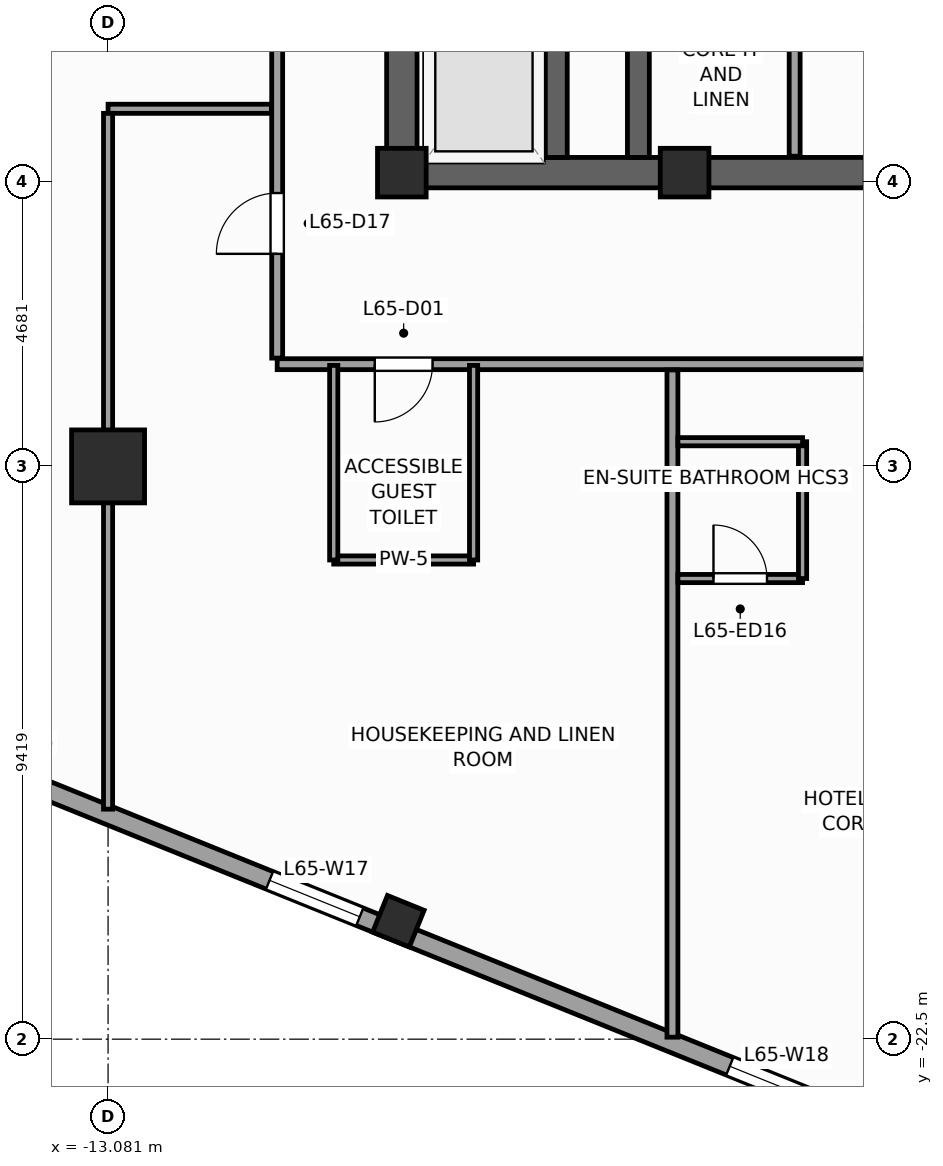
"""IFC4 building model, lengths in metres.
Left out: names, types, materials, properties, quantities, classifications, styles, units other than length and angle.
Written with IfcOpenShell. Run it as: python <this file> out.ifc"""

import sys

from ifc_helpers import new_model, si_unit, direction, frame, frame_2d, origin, origin_2d, place, context, subcontext, project, spatial, rectangle, extrude, source, transform, mapped, element, fill, save


model = new_model("IFC4")
c1 = context("Model", 3, precision=1e-05, world=origin(), true_north=direction((0.0, 1.0)))
c2 = subcontext(c1, "Body", "Model", "MODEL_VIEW")
j1 = project(units=[si_unit("LENGTHUNIT", "METRE"), si_unit("PLANEANGLEUNIT", "RADIAN")], contexts=[c1])
p1 = place(None, origin())
s1 = spatial("IfcSite", under=j1, at=p1, CompositionType="ELEMENT")
p2 = place(p1, origin())
s2 = spatial("IfcBuilding", under=s1, at=p2, CompositionType="ELEMENT")
p3 = place(p2, frame((0.0, 0.0, 268.8)))
s3 = spatial("IfcBuildingStorey", under=s2, at=p3, CompositionType="ELEMENT", Elevation=268.8)
p4 = place(p3, frame((-8.5, -8.25, 0.0), z_axis=(0.0, 0.0, 1.0), x_axis=(1.0, 0.0, 0.0)))
e1 = element("IfcWall", 1, at=p4, inside=s3, PredefinedType="SHEAR", context=c2, shape_type="SweptSolid", body=[
    extrude(rectangle(XDim=17.0, YDim=0.5, at=frame_2d((8.5, 0.0))), origin(), (0.0, 0.0, 1.0), 3.6),
])
p5 = place(p4, frame((7.85, 0.0, 0.0)))
e2 = element("IfcOpeningElement", 2, at=p5, cuts=e1, PredefinedType="OPENING", context=c2, shape_type="SweptSolid", body=[
    extrude(rectangle(XDim=1.3, YDim=2.2, at=frame_2d((0.65, 1.1))), frame((0.0, 0.26, 0.0), z_axis=(0.0, -1.0, 0.0), x_axis=(1.0, 0.0, 0.0)), (0.0, 0.0, 1.0), 0.52),
])
p6 = place(p3, frame((-8.25, -8.0, 0.0), z_axis=(0.0, 0.0, 1.0), x_axis=(0.0, 1.0, 0.0)))
e3 = element("IfcWall", 3, at=p6, inside=s3, PredefinedType="SHEAR", context=c2, shape_type="SweptSolid", body=[
    extrude(rectangle(XDim=16.0, YDim=0.5, at=frame_2d((8.0, 0.0))), origin(), (0.0, 0.0, 1.0), 3.6),
])
p7 = place(p6, frame((4.69, 0.0, 0.0)))
e4 = element("IfcOpeningElement", 4, at=p7, cuts=e3, PredefinedType="OPENING", context=c2, shape_type="SweptSolid", body=[
    extrude(rectangle(XDim=1.3, YDim=2.2, at=frame_2d((0.65, 1.1))), frame((0.0, 0.26, 0.0), z_axis=(0.0, -1.0, 0.0), x_axis=(1.0, 0.0, 0.0)), (0.0, 0.0, 1.0), 0.52),
])
p8 = place(p3, frame((-4.36, -8.0, 0.0), z_axis=(0.0, 0.0, 1.0), x_axis=(0.0, 1.0, 0.0)))
e5 = element("IfcWall", 5, at=p8, inside=s3, PredefinedType="SHEAR", context=c2, shape_type="SweptSolid", body=[
    extrude(rectangle(XDim=16.0, YDim=0.36, at=frame_2d((8.0, 0.0))), origin(), (0.0, 0.0, 1.0), 3.6),
])
p9 = place(p3, frame((-5.71, -8.0, 0.0), z_axis=(0.0, 0.0, 1.0), x_axis=(0.0, 1.0, 0.0)))
e6 = element("IfcWall", 6, at=p9, inside=s3, PredefinedType="SHEAR", context=c2, shape_type="SweptSolid", body=[
    extrude(rectangle(XDim=2.54, YDim=0.36, at=frame_2d((1.27, 0.0))), origin(), (0.0, 0.0, 1.0), 3.6),
])
m1 = source(origin(), c2, "Body", "SweptSolid", [
    extrude(rectangle(XDim=0.8, YDim=0.8, at=origin_2d()), origin(), (0.0, 0.0, 1.0), 3.6),
])
for number, where, z_axis, x_axis in (
    (7, (-8.25, -8.25, 0.0), (0.0, 0.0, 1.0), (1.0, 0.0, 0.0)),
    (8, (-3.6, -8.25, 0.0), (0.0, 0.0, 1.0), (1.0, 0.0, 0.0)),
):
    element("IfcColumn", number, at=place(p3, frame(where, z_axis=z_axis, x_axis=x_axis)), inside=s3, PredefinedType="PILASTER", context=c2, shape_type="MappedRepresentation", body=[
        mapped(m1, transform((0.0, 0.0, 0.0), scale=1.0)),
    ])
m2 = source(origin(), c2, "Body", "SweptSolid", [
    extrude(rectangle(XDim=1.2, YDim=1.2, at=origin_2d()), origin(), (0.0, 0.0, 1.0), 3.6),
])
p10 = place(p3, frame((-13.081, -13.081, 0.0), z_axis=(0.0, 0.0, 1.0), x_axis=(1.0, 0.0, 0.0)))
e9 = element("IfcColumn", 9, at=p10, inside=s3, PredefinedType="COLUMN", context=c2, shape_type="MappedRepresentation", body=[
    mapped(m2, transform((0.0, 0.0, 0.0), scale=1.0)),
])
m3 = source(origin(), c2, "Body", "SweptSolid", [
    extrude(rectangle(XDim=0.65, YDim=0.65, at=origin_2d()), origin(), (0.0, 0.0, 1.0), 3.6),
])
p11 = place(p3, frame((-8.307, -20.56, 0.0), z_axis=(0.0, 0.0, 1.0), x_axis=(0.374606593416, 0.927183854567, 0.0)))
e10 = element("IfcColumn", 10, at=p11, inside=s3, PredefinedType="COLUMN", context=c2, shape_type="MappedRepresentation", body=[
    mapped(m3, transform((0.0, 0.0, 0.0), scale=1.0)),
])
p12 = place(p3, frame((-23.813, -14.479, 0.0), z_axis=(0.0, 0.0, 1.0), x_axis=(0.927182657188, -0.374609557019, 0.0)))
e11 = element("IfcWall", 11, at=p12, inside=s3, PredefinedType="STANDARD", context=c2, shape_type="SweptSolid", body=[
    extrude(rectangle(XDim=33.31, YDim=0.31, at=frame_2d((16.655, 0.0))), origin(), (0.0, 0.0, 1.0), 2.75),
])
p13 = place(p12, frame((3.197, 0.0, 0.47)))
e12 = element("IfcOpeningElement", 12, at=p13, cuts=e11, PredefinedType="OPENING", context=c2, shape_type="SweptSolid", body=[
    extrude(rectangle(XDim=1.6, YDim=2.1, at=frame_2d((0.8, 1.05))), frame((0.0, 0.165, 0.0), z_axis=(0.0, -1.0, 0.0), x_axis=(1.0, 0.0, 0.0)), (0.0, 0.0, 1.0), 0.33),
])
p14 = place(p12, frame((8.86, 0.0, 0.47)))
e13 = element("IfcOpeningElement", 13, at=p14, cuts=e11, PredefinedType="OPENING", context=c2, shape_type="SweptSolid", body=[
    extrude(rectangle(XDim=1.6, YDim=2.1, at=frame_2d((0.8, 1.05))), frame((0.0, 0.165, 0.0), z_axis=(0.0, -1.0, 0.0), x_axis=(1.0, 0.0, 0.0)), (0.0, 0.0, 1.0), 0.33),
])
p15 = place(p12, frame((14.439, 0.0, 0.47)))
e14 = element("IfcOpeningElement", 14, at=p15, cuts=e11, PredefinedType="OPENING", context=c2, shape_type="SweptSolid", body=[
    extrude(rectangle(XDim=1.6, YDim=2.1, at=frame_2d((0.8, 1.05))), frame((0.0, 0.165, 0.0), z_axis=(0.0, -1.0, 0.0), x_axis=(1.0, 0.0, 0.0)), (0.0, 0.0, 1.0), 0.33),
])
p16 = place(p12, frame((22.601, 0.0, 0.47)))
e15 = element("IfcOpeningElement", 15, at=p16, cuts=e11, PredefinedType="OPENING", context=c2, shape_type="SweptSolid", body=[
    extrude(rectangle(XDim=1.6, YDim=2.1, at=frame_2d((0.8, 1.05))), frame((0.0, 0.165, 0.0), z_axis=(0.0, -1.0, 0.0), x_axis=(1.0, 0.0, 0.0)), (0.0, 0.0, 1.0), 0.33),
])
p17 = place(p12, frame((27.097, 0.0, 0.47)))
e16 = element("IfcOpeningElement", 16, at=p17, cuts=e11, PredefinedType="OPENING", context=c2, shape_type="SweptSolid", body=[
    extrude(rectangle(XDim=1.6, YDim=2.1, at=frame_2d((0.8, 1.05))), frame((0.0, 0.165, 0.0), z_axis=(0.0, -1.0, 0.0), x_axis=(1.0, 0.0, 0.0)), (0.0, 0.0, 1.0), 0.33),
])
p18 = place(p3, frame((-1.79, -7.98, 0.0), z_axis=(0.0, 0.0, 1.0), x_axis=(0.0, 1.0, 0.0)))
e17 = element("IfcWall", 17, at=p18, inside=s3, PredefinedType="PARTITIONING", context=c2, shape_type="SweptSolid", body=[
    extrude(rectangle(XDim=12.38, YDim=0.18, at=frame_2d((6.19, 0.0))), origin(), (0.0, 0.0, 1.0), 3.35),
])
p19 = place(p18, frame((8.8, 0.0, 0.0)))
e18 = element("IfcOpeningElement", 18, at=p19, cuts=e17, PredefinedType="OPENING", context=c2, shape_type="SweptSolid", body=[
    extrude(rectangle(XDim=1.1, YDim=2.2, at=frame_2d((0.55, 1.1))), frame((0.0, 0.1, 0.0), z_axis=(0.0, -1.0, 0.0), x_axis=(1.0, 0.0, 0.0)), (0.0, 0.0, 1.0), 0.2),
])
p20 = place(p18, frame((10.86, 0.0, 0.0)))
e19 = element("IfcOpeningElement", 19, at=p20, cuts=e17, PredefinedType="OPENING", context=c2, shape_type="SweptSolid", body=[
    extrude(rectangle(XDim=1.1, YDim=2.2, at=frame_2d((0.55, 1.1))), frame((0.0, 0.1, 0.0), z_axis=(0.0, -1.0, 0.0), x_axis=(1.0, 0.0, 0.0)), (0.0, 0.0, 1.0), 0.2),
])
p21 = place(p18, frame((3.5, 0.0, 0.0)))
e20 = element("IfcOpeningElement", 20, at=p21, cuts=e17, PredefinedType="OPENING", context=c2, shape_type="SweptSolid", body=[
    extrude(rectangle(XDim=1.15, YDim=2.25, at=frame_2d((0.575, 1.125))), frame((0.0, 0.1, 0.0), z_axis=(0.0, -1.0, 0.0), x_axis=(1.0, 0.0, 0.0)), (0.0, 0.0, 1.0), 0.2),
])
p22 = place(p3, frame((-10.3, -11.4, 0.0), z_axis=(0.0, 0.0, 1.0), x_axis=(1.0, 0.0, 0.0)))
e21 = element("IfcWall", 21, at=p22, inside=s3, PredefinedType="PARTITIONING", context=c2, shape_type="SweptSolid", body=[
    extrude(rectangle(XDim=21.7, YDim=0.18, at=frame_2d((10.85, 0.0))), origin(), (0.0, 0.0, 1.0), 3.35),
])
p23 = place(p22, frame((1.605, 0.0, 0.0)))
e22 = element("IfcOpeningElement", 22, at=p23, cuts=e21, PredefinedType="OPENING", context=c2, shape_type="SweptSolid", body=[
    extrude(rectangle(XDim=0.95, YDim=2.1, at=frame_2d((0.475, 1.05))), frame((0.0, 0.1, 0.0), z_axis=(0.0, -1.0, 0.0), x_axis=(1.0, 0.0, 0.0)), (0.0, 0.0, 1.0), 0.2),
])
p24 = place(p22, frame((17.236, 0.0, 0.0)))
e23 = element("IfcOpeningElement", 23, at=p24, cuts=e21, PredefinedType="OPENING", context=c2, shape_type="SweptSolid", body=[
    extrude(rectangle(XDim=1.0, YDim=2.15, at=frame_2d((0.5, 1.075))), frame((0.0, 0.1, 0.0), z_axis=(0.0, -1.0, 0.0), x_axis=(1.0, 0.0, 0.0)), (0.0, 0.0, 1.0), 0.2),
])
p25 = place(p22, frame((9.8, 0.0, 0.0)))
e24 = element("IfcOpeningElement", 24, at=p25, cuts=e21, PredefinedType="OPENING", context=c2, shape_type="SweptSolid", body=[
    extrude(rectangle(XDim=1.0, YDim=2.15, at=frame_2d((0.5, 1.075))), frame((0.0, 0.1, 0.0), z_axis=(0.0, -1.0, 0.0), x_axis=(1.0, 0.0, 0.0)), (0.0, 0.0, 1.0), 0.2),
])
p26 = place(p3, frame((-10.3, -11.3, 0.0), z_axis=(0.0, 0.0, 1.0), x_axis=(0.0, 1.0, 0.0)))
e25 = element("IfcWall", 25, at=p26, inside=s3, PredefinedType="PARTITIONING", context=c2, shape_type="SweptSolid", body=[
    extrude(rectangle(XDim=21.5, YDim=0.18, at=frame_2d((10.75, 0.0))), origin(), (0.0, 0.0, 1.0), 3.35),
])
p27 = place(p26, frame((12.9, 0.0, 0.0)))
e26 = element("IfcOpeningElement", 26, at=p27, cuts=e25, PredefinedType="OPENING", context=c2, shape_type="SweptSolid", body=[
    extrude(rectangle(XDim=1.0, YDim=2.15, at=frame_2d((0.5, 1.075))), frame((0.0, 0.1, 0.0), z_axis=(0.0, -1.0, 0.0), x_axis=(1.0, 0.0, 0.0)), (0.0, 0.0, 1.0), 0.2),
])
p28 = place(p26, frame((17.736, 0.0, 0.0)))
e27 = element("IfcOpeningElement", 27, at=p28, cuts=e25, PredefinedType="OPENING", context=c2, shape_type="SweptSolid", body=[
    extrude(rectangle(XDim=1.0, YDim=2.15, at=frame_2d((0.5, 1.075))), frame((0.0, 0.1, 0.0), z_axis=(0.0, -1.0, 0.0), x_axis=(1.0, 0.0, 0.0)), (0.0, 0.0, 1.0), 0.2),
])
p29 = place(p26, frame((1.714, 0.0, 0.0)))
e28 = element("IfcOpeningElement", 28, at=p29, cuts=e25, PredefinedType="OPENING", context=c2, shape_type="SweptSolid", body=[
    extrude(rectangle(XDim=1.0, YDim=2.15, at=frame_2d((0.5, 1.075))), frame((0.0, 0.1, 0.0), z_axis=(0.0, -1.0, 0.0), x_axis=(1.0, 0.0, 0.0)), (0.0, 0.0, 1.0), 0.2),
])
p30 = place(p26, frame((5.4, 0.0, 0.0)))
e29 = element("IfcOpeningElement", 29, at=p30, cuts=e25, PredefinedType="OPENING", context=c2, shape_type="SweptSolid", body=[
    extrude(rectangle(XDim=1.0, YDim=2.15, at=frame_2d((0.5, 1.075))), frame((0.0, 0.1, 0.0), z_axis=(0.0, -1.0, 0.0), x_axis=(1.0, 0.0, 0.0)), (0.0, 0.0, 1.0), 0.2),
])
p31 = place(p26, frame((9.1, 0.0, 0.0)))
e30 = element("IfcOpeningElement", 30, at=p31, cuts=e25, PredefinedType="OPENING", context=c2, shape_type="SweptSolid", body=[
    extrude(rectangle(XDim=1.0, YDim=2.15, at=frame_2d((0.5, 1.075))), frame((0.0, 0.1, 0.0), z_axis=(0.0, -1.0, 0.0), x_axis=(1.0, 0.0, 0.0)), (0.0, 0.0, 1.0), 0.2),
])
p32 = place(p3, frame((-3.8, -11.495, 0.0), z_axis=(0.0, 0.0, 1.0), x_axis=(0.0, -1.0, 0.0)))
e31 = element("IfcWall", 31, at=p32, inside=s3, PredefinedType="PARTITIONING", context=c2, shape_type="SweptSolid", body=[
    extrude(rectangle(XDim=10.972, YDim=0.18, at=frame_2d((5.486, 0.0))), origin(), (0.0, 0.0, 1.0), 3.35),
])
p33 = place(p3, frame((-10.395, -7.2, 0.0), z_axis=(0.0, 0.0, 1.0), x_axis=(-1.0, 0.0, 0.0)))
e32 = element("IfcWall", 32, at=p33, inside=s3, PredefinedType="PARTITIONING", context=c2, shape_type="SweptSolid", body=[
    extrude(rectangle(XDim=2.686, YDim=0.15, at=frame_2d((1.343, 0.0))), origin(), (0.0, 0.0, 1.0), 3.35),
])
p34 = place(p3, frame((-13.081, -7.275, 0.0), z_axis=(0.0, 0.0, 1.0), x_axis=(0.0, -1.0, 0.0)))
e33 = element("IfcWall", 33, at=p34, inside=s3, PredefinedType="PARTITIONING", context=c2, shape_type="SweptSolid", body=[
    extrude(rectangle(XDim=11.443, YDim=0.15, at=frame_2d((5.721, 0.0))), origin(), (0.0, 0.0, 1.0), 2.45),
])
p35 = place(p3, frame((-9.37, -14.62, 0.0), z_axis=(0.0, 0.0, 1.0), x_axis=(1.0, 0.0, 0.0)))
e34 = element("IfcWall", 34, at=p35, inside=s3, PredefinedType="PARTITIONING", context=c2, shape_type="SweptSolid", body=[
    extrude(rectangle(XDim=2.3, YDim=0.135, at=frame_2d((1.15, 0.0))), origin(), (0.0, 0.0, 1.0), 2.95),
])
for number, where, z_axis, x_axis in (
    (35, (-7.07, -14.62, 0.0), (0.0, 0.0, 1.0), (0.0, 1.0, 0.0)),
    (36, (-9.37, -14.62, 0.0), (0.0, 0.0, 1.0), (0.0, 1.0, 0.0)),
):
    element("IfcWall", number, at=place(p3, frame(where, z_axis=z_axis, x_axis=x_axis)), inside=s3, PredefinedType="PARTITIONING", context=c2, shape_type="SweptSolid", body=[
        extrude(rectangle(XDim=3.2, YDim=0.135, at=frame_2d((1.6, 0.0))), origin(), (0.0, 0.0, 1.0), 3.35),
    ])
p36 = place(p3, frame((-3.71, -14.925, 0.0), z_axis=(0.0, 0.0, 1.0), x_axis=(1.0, 0.0, 0.0)))
e37 = element("IfcWall", 37, at=p36, inside=s3, PredefinedType="PARTITIONING", context=c2, shape_type="SweptSolid", body=[
    extrude(rectangle(XDim=2.05, YDim=0.135, at=frame_2d((1.025, 0.0))), origin(), (0.0, 0.0, 1.0), 3.35),
])
p37 = place(p36, frame((0.585, 0.0, 0.0)))
e38 = element("IfcOpeningElement", 38, at=p37, cuts=e37, PredefinedType="OPENING", context=c2, shape_type="SweptSolid", body=[
    extrude(rectangle(XDim=0.88, YDim=2.1, at=frame_2d((0.44, 1.05))), frame((0.0, 0.078, 0.0), z_axis=(0.0, -1.0, 0.0), x_axis=(1.0, 0.0, 0.0)), (0.0, 0.0, 1.0), 0.155),
])
p38 = place(p3, frame((-1.66, -14.925, 0.0), z_axis=(0.0, 0.0, 1.0), x_axis=(0.0, 1.0, 0.0)))
e39 = element("IfcWall", 39, at=p38, inside=s3, PredefinedType="PARTITIONING", context=c2, shape_type="SweptSolid", body=[
    extrude(rectangle(XDim=2.25, YDim=0.135, at=frame_2d((1.125, 0.0))), origin(), (0.0, 0.0, 1.0), 3.35),
])
p39 = place(p3, frame((-3.71, -12.675, 0.0), z_axis=(0.0, 0.0, 1.0), x_axis=(1.0, 0.0, 0.0)))
e40 = element("IfcWall", 40, at=p39, inside=s3, PredefinedType="PARTITIONING", context=c2, shape_type="SweptSolid", body=[
    extrude(rectangle(XDim=2.05, YDim=0.135, at=frame_2d((1.025, 0.0))), origin(), (0.0, 0.0, 1.0), 3.35),
])
m4 = source(origin(), c2, "Body", "SweptSolid", [
    extrude(rectangle(XDim=1.6, YDim=2.1, at=frame_2d((0.8, 1.05))), frame((0.0, 0.03, 0.0), z_axis=(0.0, -1.0, 0.0), x_axis=(1.0, 0.0, 0.0)), (0.0, 0.0, 1.0), 0.06),
])
p40 = place(p15, origin())
e41 = element("IfcWindow", 41, at=p40, inside=s3, PartitioningType="SINGLE_PANEL", PredefinedType="WINDOW", context=c2, shape_type="MappedRepresentation", body=[
    mapped(m4, transform((0.0, 0.0, 0.0), scale=1.0)),
])
fill(e14, e41)
p41 = place(p16, origin())
e42 = element("IfcWindow", 42, at=p41, inside=s3, PartitioningType="SINGLE_PANEL", PredefinedType="WINDOW", context=c2, shape_type="MappedRepresentation", body=[
    mapped(m4, transform((0.0, 0.0, 0.0), scale=1.0)),
])
fill(e15, e42)
m5 = source(origin(), c2, "Body", "SweptSolid", [
    extrude(rectangle(XDim=0.95, YDim=2.1, at=frame_2d((0.475, 1.05))), frame((0.0, 0.025, 0.0), z_axis=(0.0, -1.0, 0.0), x_axis=(1.0, 0.0, 0.0)), (0.0, 0.0, 1.0), 0.05),
])
p42 = place(p23, frame((0.95, 0.0, 0.0), z_axis=(0.0, 0.0, 1.0), x_axis=(-1.0, 0.0, 0.0)))
e43 = element("IfcDoor", 43, at=p42, inside=s3, OperationType="SINGLE_SWING_LEFT", PredefinedType="DOOR", context=c2, shape_type="MappedRepresentation", body=[
    mapped(m5, transform((0.0, 0.0, 0.0), scale=1.0)),
])
fill(e22, e43)
m6 = source(origin(), c2, "Body", "SweptSolid", [
    extrude(rectangle(XDim=0.88, YDim=2.1, at=frame_2d((0.44, 1.05))), frame((0.0, 0.025, 0.0), z_axis=(0.0, -1.0, 0.0), x_axis=(1.0, 0.0, 0.0)), (0.0, 0.0, 1.0), 0.05),
])
p43 = place(p37, origin())
e44 = element("IfcDoor", 44, at=p43, inside=s3, OperationType="SINGLE_SWING_LEFT", PredefinedType="DOOR", context=c2, shape_type="MappedRepresentation", body=[
    mapped(m6, transform((0.0, 0.0, 0.0), scale=1.0)),
])
fill(e38, e44)
m7 = source(origin(), c2, "Body", "SweptSolid", [
    extrude(rectangle(XDim=1.0, YDim=2.15, at=frame_2d((0.5, 1.075))), frame((0.0, 0.025, 0.0), z_axis=(0.0, -1.0, 0.0), x_axis=(1.0, 0.0, 0.0)), (0.0, 0.0, 1.0), 0.05),
])
p44 = place(p29, origin())
e45 = element("IfcDoor", 45, at=p44, inside=s3, OperationType="SINGLE_SWING_LEFT", PredefinedType="DOOR", context=c2, shape_type="MappedRepresentation", body=[
    mapped(m7, transform((0.0, 0.0, 0.0), scale=1.0)),
])
fill(e28, e45)
save(model, sys.argv[1])
